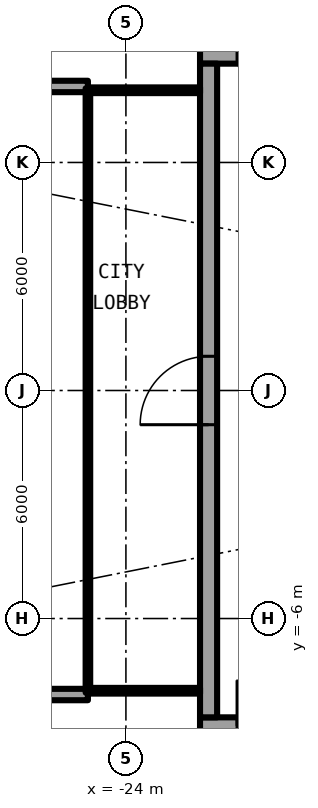
"""IFC4 building model, lengths in metres.
Left out: names, types, materials, properties, quantities, classifications, styles, units other than length and angle.
Written with IfcOpenShell. Run it as: python <this file> out.ifc"""

import sys

from ifc_helpers import new_model, si_unit, direction, frame, frame_2d, origin, place, context, subcontext, project, spatial, rectangle, extrude, element, fill, save


model = new_model("IFC4")
c1 = context("Model", 3, precision=1e-05, world=origin(), true_north=direction((0.0, 1.0)))
c2 = subcontext(c1, "Body", "Model", "MODEL_VIEW")
j1 = project(units=[si_unit("LENGTHUNIT", "METRE"), si_unit("PLANEANGLEUNIT", "RADIAN")], contexts=[c1])
p1 = place(None, origin())
s1 = spatial("IfcSite", under=j1, at=p1, CompositionType="ELEMENT")
p2 = place(p1, origin())
s2 = spatial("IfcBuilding", under=s1, at=p2, CompositionType="ELEMENT")
p3 = place(p2, frame((0.0, 0.0, 218.8)))
s3 = spatial("IfcBuildingStorey", under=s2, at=p3, CompositionType="ELEMENT", Elevation=218.8)
for number, where, z_axis, x_axis in (
    (1, (-25.0, 8.0, 0.0), (0.0, 0.0, 1.0), (-1.0, 0.0, 0.0)),
    (2, (-25.0, -8.0, 0.0), (0.0, 0.0, 1.0), (-1.0, 0.0, 0.0)),
):
    element("IfcWall", number, at=place(p3, frame(where, z_axis=z_axis, x_axis=x_axis)), inside=s3, PredefinedType="SOLIDWALL", context=c2, shape_type="SweptSolid", body=[
        extrude(rectangle(XDim=2.667, YDim=0.3, at=frame_2d((1.333, 0.0))), origin(), (0.0, 0.0, 1.0), 2.65),
    ])
p4 = place(p3, frame((-22.05, -8.825, 0.0), z_axis=(0.0, 0.0, 1.0), x_axis=(1.0, 0.0, 0.0)))
e3 = element("IfcWall", 3, at=p4, inside=s3, PredefinedType="SHEAR", context=c2, shape_type="SweptSolid", body=[
    extrude(rectangle(XDim=13.5, YDim=0.45, at=frame_2d((6.75, 0.0))), origin(), (0.0, 0.0, 1.0), 3.05),
])
p5 = place(p4, frame((0.975, 0.0, 0.0)))
e4 = element("IfcOpeningElement", 4, at=p5, cuts=e3, PredefinedType="OPENING", context=c2, shape_type="SweptSolid", body=[
    extrude(rectangle(XDim=1.2, YDim=2.3, at=frame_2d((0.6, 1.15))), frame((0.0, 0.235, 0.0), z_axis=(0.0, -1.0, 0.0), x_axis=(1.0, 0.0, 0.0)), (0.0, 0.0, 1.0), 0.47),
])
p6 = place(p3, frame((-8.55, 8.825, 0.0), z_axis=(0.0, 0.0, 1.0), x_axis=(-1.0, 0.0, 0.0)))
e5 = element("IfcWall", 5, at=p6, inside=s3, PredefinedType="SHEAR", context=c2, shape_type="SweptSolid", body=[
    extrude(rectangle(XDim=13.5, YDim=0.45, at=frame_2d((6.75, 0.0))), origin(), (0.0, 0.0, 1.0), 3.05),
])
p7 = place(p6, frame((11.325, 0.0, 0.0)))
e6 = element("IfcOpeningElement", 6, at=p7, cuts=e5, PredefinedType="OPENING", context=c2, shape_type="SweptSolid", body=[
    extrude(rectangle(XDim=1.2, YDim=2.3, at=frame_2d((0.6, 1.15))), frame((0.0, 0.235, 0.0), z_axis=(0.0, -1.0, 0.0), x_axis=(1.0, 0.0, 0.0)), (0.0, 0.0, 1.0), 0.47),
])
p8 = place(p3, frame((-21.825, -8.6, 0.0), z_axis=(0.0, 0.0, 1.0), x_axis=(0.0, 1.0, 0.0)))
e7 = element("IfcWall", 7, at=p8, inside=s3, PredefinedType="SHEAR", context=c2, shape_type="SweptSolid", body=[
    extrude(rectangle(XDim=17.2, YDim=0.45, at=frame_2d((8.6, 0.0))), origin(), (0.0, 0.0, 1.0), 3.05),
])
p9 = place(p8, frame((7.7, 0.0, 0.0)))
e8 = element("IfcOpeningElement", 8, at=p9, cuts=e7, PredefinedType="OPENING", context=c2, shape_type="SweptSolid", body=[
    extrude(rectangle(XDim=1.8, YDim=2.3, at=frame_2d((0.9, 1.15))), frame((0.0, 0.235, 0.0), z_axis=(0.0, -1.0, 0.0), x_axis=(1.0, 0.0, 0.0)), (0.0, 0.0, 1.0), 0.47),
])
for number, where, z_axis, x_axis in (
    (9, (-22.05, 7.9, 0.0), (0.0, 0.0, 1.0), (-1.0, 0.0, 0.0)),
    (10, (-22.05, -7.9, 0.0), (0.0, 0.0, 1.0), (-1.0, 0.0, 0.0)),
):
    element("IfcWall", number, at=place(p3, frame(where, z_axis=z_axis, x_axis=x_axis)), inside=s3, PredefinedType="PARTITIONING", context=c2, shape_type="SweptSolid", body=[
        extrude(rectangle(XDim=2.89, YDim=0.15, at=frame_2d((1.445, 0.0))), origin(), (0.0, 0.0, 1.0), 2.65),
    ])
p10 = place(p3, frame((-25.0, 7.95, 0.0), z_axis=(0.0, 0.0, 1.0), x_axis=(0.0, -1.0, 0.0)))
e11 = element("IfcWall", 11, at=p10, inside=s3, PredefinedType="PARTITIONING", context=c2, shape_type="SweptSolid", body=[
    extrude(rectangle(XDim=15.9, YDim=0.12, at=frame_2d((7.95, 0.0))), origin(), (0.0, 0.0, 1.0), 2.65),
])
p11 = place(p10, frame((0.95, 0.0, 0.1)))
e12 = element("IfcOpeningElement", 12, at=p11, cuts=e11, PredefinedType="OPENING", context=c2, shape_type="SweptSolid", body=[
    extrude(rectangle(XDim=14.0, YDim=1.85, at=frame_2d((7.0, 0.925))), frame((0.0, 0.07, 0.0), z_axis=(0.0, -1.0, 0.0), x_axis=(1.0, 0.0, 0.0)), (0.0, 0.0, 1.0), 0.14),
])
p12 = place(p5, origin())
e13 = element("IfcDoor", 13, at=p12, inside=s3, OperationType="SINGLE_SWING_RIGHT", PredefinedType="DOOR", context=c2, shape_type="SweptSolid", body=[
    extrude(rectangle(XDim=1.2, YDim=2.3, at=frame_2d((0.6, 1.15))), frame((0.0, 0.025, 0.0), z_axis=(0.0, -1.0, 0.0), x_axis=(1.0, 0.0, 0.0)), (0.0, 0.0, 1.0), 0.05),
])
fill(e4, e13)
p13 = place(p7, origin())
e14 = element("IfcDoor", 14, at=p13, inside=s3, OperationType="SINGLE_SWING_LEFT", PredefinedType="DOOR", context=c2, shape_type="SweptSolid", body=[
    extrude(rectangle(XDim=1.2, YDim=2.3, at=frame_2d((0.6, 1.15))), frame((0.0, 0.025, 0.0), z_axis=(0.0, -1.0, 0.0), x_axis=(1.0, 0.0, 0.0)), (0.0, 0.0, 1.0), 0.05),
])
fill(e6, e14)
p14 = place(p9, origin())
e15 = element("IfcDoor", 15, at=p14, inside=s3, OperationType="SINGLE_SWING_LEFT", PredefinedType="DOOR", context=c2, shape_type="SweptSolid", body=[
    extrude(rectangle(XDim=1.8, YDim=2.3, at=frame_2d((0.9, 1.15))), frame((0.0, 0.025, 0.0), z_axis=(0.0, -1.0, 0.0), x_axis=(1.0, 0.0, 0.0)), (0.0, 0.0, 1.0), 0.05),
])
fill(e8, e15)
p15 = place(p11, origin())
e16 = element("IfcWindow", 16, at=p15, inside=s3, PartitioningType="SINGLE_PANEL", PredefinedType="WINDOW", context=c2, shape_type="SweptSolid", body=[
    extrude(rectangle(XDim=14.0, YDim=1.85, at=frame_2d((7.0, 0.925))), frame((0.0, 0.03, 0.0), z_axis=(0.0, -1.0, 0.0), x_axis=(1.0, 0.0, 0.0)), (0.0, 0.0, 1.0), 0.06),
])
fill(e12, e16)
save(model, sys.argv[1])
